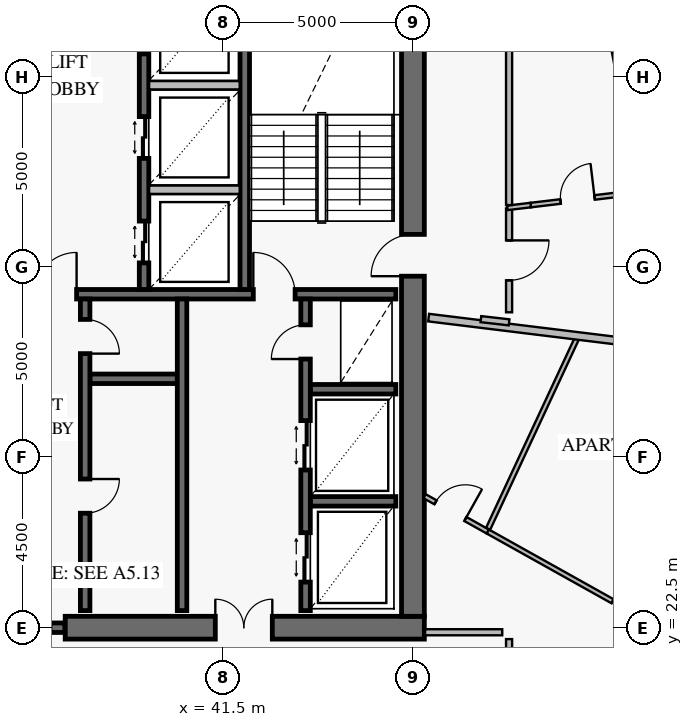
"""IFC4 building model, lengths in metres.
Left out: names, types, materials, properties, quantities, classifications, styles, units other than length and angle.
Written with IfcOpenShell. Run it as: python <this file> out.ifc"""

import sys

from ifc_helpers import new_model, si_unit, direction, frame, frame_2d, origin, place, context, subcontext, project, spatial, rectangle, extrude, element, fill, save


model = new_model("IFC4")
c1 = context("Model", 3, precision=1e-05, world=origin(), true_north=direction((0.0, 1.0)))
c2 = subcontext(c1, "Body", "Model", "MODEL_VIEW")
j1 = project(units=[si_unit("LENGTHUNIT", "METRE"), si_unit("PLANEANGLEUNIT", "RADIAN")], contexts=[c1])
p1 = place(None, origin())
s1 = spatial("IfcSite", under=j1, at=p1, CompositionType="ELEMENT")
p2 = place(p1, origin())
s2 = spatial("IfcBuilding", under=s1, at=p2, CompositionType="ELEMENT")
p3 = place(p2, frame((0.0, 0.0, 265.4)))
s3 = spatial("IfcBuildingStorey", under=s2, at=p3, CompositionType="ELEMENT", Elevation=265.4)
p4 = place(p3, frame((37.35, 22.5, 0.0), z_axis=(0.0, 0.0, 1.0), x_axis=(1.0, 0.0, 0.0)))
e1 = element("IfcWall", 1, at=p4, inside=s3, PredefinedType="SHEAR", context=c2, shape_type="SweptSolid", body=[
    extrude(rectangle(XDim=9.45, YDim=0.6, at=frame_2d((4.725, 0.0))), origin(), (0.0, 0.0, 1.0), 3.8),
])
p5 = place(p4, frame((3.95, 0.0, 0.0)))
e2 = element("IfcOpeningElement", 2, at=p5, cuts=e1, PredefinedType="OPENING", context=c2, shape_type="SweptSolid", body=[
    extrude(rectangle(XDim=1.5, YDim=2.15, at=frame_2d((0.75, 1.075))), frame((0.0, 0.312, 0.0), z_axis=(0.0, -1.0, 0.0), x_axis=(1.0, 0.0, 0.0)), (0.0, 0.0, 1.0), 0.624),
])
p6 = place(p3, frame((46.5, 22.8, 0.0), z_axis=(0.0, 0.0, 1.0), x_axis=(0.0, 1.0, 0.0)))
e3 = element("IfcWall", 3, at=p6, inside=s3, PredefinedType="SHEAR", context=c2, shape_type="SweptSolid", body=[
    extrude(rectangle(XDim=18.4, YDim=0.6, at=frame_2d((9.2, 0.0))), origin(), (0.0, 0.0, 1.0), 3.8),
])
p7 = place(p6, frame((8.95, 0.0, 0.0)))
e4 = element("IfcOpeningElement", 4, at=p7, cuts=e3, PredefinedType="OPENING", context=c2, shape_type="SweptSolid", body=[
    extrude(rectangle(XDim=1.1, YDim=2.15, at=frame_2d((0.55, 1.075))), frame((0.0, 0.312, 0.0), z_axis=(0.0, -1.0, 0.0), x_axis=(1.0, 0.0, 0.0)), (0.0, 0.0, 1.0), 0.624),
])
p8 = place(p3, frame((35.06, 22.5, 0.0), z_axis=(0.0, 0.0, 1.0), x_axis=(1.0, 0.0, 0.0)))
e5 = element("IfcWall", 5, at=p8, inside=s3, PredefinedType="SOLIDWALL", context=c2, shape_type="SweptSolid", body=[
    extrude(rectangle(XDim=2.28, YDim=0.25, at=frame_2d((1.14, 0.0))), origin(), (0.0, 0.0, 1.0), 3.8),
])
p9 = place(p8, frame((0.39, 0.0, 0.0)))
e6 = element("IfcOpeningElement", 6, at=p9, cuts=e5, PredefinedType="OPENING", context=c2, shape_type="SweptSolid", body=[
    extrude(rectangle(XDim=1.5, YDim=2.15, at=frame_2d((0.75, 1.075))), frame((0.0, 0.137, 0.0), z_axis=(0.0, -1.0, 0.0), x_axis=(1.0, 0.0, 0.0)), (0.0, 0.0, 1.0), 0.274),
])
p10 = place(p3, frame((25.95, 31.275, 0.0), z_axis=(0.0, 0.0, 1.0), x_axis=(1.0, 0.0, 0.0)))
e7 = element("IfcWall", 7, at=p10, inside=s3, PredefinedType="SOLIDWALL", context=c2, shape_type="SweptSolid", body=[
    extrude(rectangle(XDim=20.1, YDim=0.25, at=frame_2d((10.05, 0.0))), origin(), (0.0, 0.0, 1.0), 3.8),
])
p11 = place(p10, frame((2.6, 0.0, 0.0)))
e8 = element("IfcOpeningElement", 8, at=p11, cuts=e7, PredefinedType="OPENING", context=c2, shape_type="SweptSolid", body=[
    extrude(rectangle(XDim=1.1, YDim=2.15, at=frame_2d((0.55, 1.075))), frame((0.0, 0.137, 0.0), z_axis=(0.0, -1.0, 0.0), x_axis=(1.0, 0.0, 0.0)), (0.0, 0.0, 1.0), 0.274),
])
p12 = place(p10, frame((10.6, 0.0, 0.0)))
e9 = element("IfcOpeningElement", 9, at=p12, cuts=e7, PredefinedType="OPENING", context=c2, shape_type="SweptSolid", body=[
    extrude(rectangle(XDim=1.1, YDim=2.15, at=frame_2d((0.55, 1.075))), frame((0.0, 0.137, 0.0), z_axis=(0.0, -1.0, 0.0), x_axis=(1.0, 0.0, 0.0)), (0.0, 0.0, 1.0), 0.274),
])
p13 = place(p10, frame((16.35, 0.0, 0.0)))
e10 = element("IfcOpeningElement", 10, at=p13, cuts=e7, PredefinedType="OPENING", context=c2, shape_type="SweptSolid", body=[
    extrude(rectangle(XDim=1.1, YDim=2.15, at=frame_2d((0.55, 1.075))), frame((0.0, 0.137, 0.0), z_axis=(0.0, -1.0, 0.0), x_axis=(1.0, 0.0, 0.0)), (0.0, 0.0, 1.0), 0.274),
])
p14 = place(p3, frame((42.075, 31.4, 0.0), z_axis=(0.0, 0.0, 1.0), x_axis=(0.0, 1.0, 0.0)))
e11 = element("IfcWall", 11, at=p14, inside=s3, PredefinedType="SOLIDWALL", context=c2, shape_type="SweptSolid", body=[
    extrude(rectangle(XDim=9.7, YDim=0.25, at=frame_2d((4.85, 0.0))), origin(), (0.0, 0.0, 1.0), 3.8),
])
p15 = place(p3, frame((39.425, 31.4, 0.0), z_axis=(0.0, 0.0, 1.0), x_axis=(0.0, 1.0, 0.0)))
e12 = element("IfcWall", 12, at=p15, inside=s3, PredefinedType="SOLIDWALL", context=c2, shape_type="SweptSolid", body=[
    extrude(rectangle(XDim=9.65, YDim=0.25, at=frame_2d((4.825, 0.0))), origin(), (0.0, 0.0, 1.0), 3.8),
])
p16 = place(p15, frame((0.7, 0.0, 0.0)))
e13 = element("IfcOpeningElement", 13, at=p16, cuts=e12, PredefinedType="OPENING", context=c2, shape_type="SweptSolid", body=[
    extrude(rectangle(XDim=1.1, YDim=2.2, at=frame_2d((0.55, 1.1))), frame((0.0, 0.137, 0.0), z_axis=(0.0, -1.0, 0.0), x_axis=(1.0, 0.0, 0.0)), (0.0, 0.0, 1.0), 0.274),
])
p17 = place(p15, frame((3.45, 0.0, 0.0)))
e14 = element("IfcOpeningElement", 14, at=p17, cuts=e12, PredefinedType="OPENING", context=c2, shape_type="SweptSolid", body=[
    extrude(rectangle(XDim=1.1, YDim=2.2, at=frame_2d((0.55, 1.1))), frame((0.0, 0.137, 0.0), z_axis=(0.0, -1.0, 0.0), x_axis=(1.0, 0.0, 0.0)), (0.0, 0.0, 1.0), 0.274),
])
p18 = place(p15, frame((6.2, 0.0, 0.0)))
e15 = element("IfcOpeningElement", 15, at=p18, cuts=e12, PredefinedType="OPENING", context=c2, shape_type="SweptSolid", body=[
    extrude(rectangle(XDim=1.1, YDim=2.2, at=frame_2d((0.55, 1.1))), frame((0.0, 0.137, 0.0), z_axis=(0.0, -1.0, 0.0), x_axis=(1.0, 0.0, 0.0)), (0.0, 0.0, 1.0), 0.274),
])
p19 = place(p15, frame((8.47, 0.0, 0.0)))
e16 = element("IfcOpeningElement", 16, at=p19, cuts=e12, PredefinedType="OPENING", context=c2, shape_type="SweptSolid", body=[
    extrude(rectangle(XDim=0.9, YDim=2.1, at=frame_2d((0.45, 1.05))), frame((0.0, 0.137, 0.0), z_axis=(0.0, -1.0, 0.0), x_axis=(1.0, 0.0, 0.0)), (0.0, 0.0, 1.0), 0.274),
])
p20 = place(p3, frame((38.0, 29.05, 0.0), z_axis=(0.0, 0.0, 1.0), x_axis=(1.0, 0.0, 0.0)))
e17 = element("IfcWall", 17, at=p20, inside=s3, PredefinedType="SOLIDWALL", context=c2, shape_type="SweptSolid", body=[
    extrude(rectangle(XDim=2.3, YDim=0.25, at=frame_2d((1.15, 0.0))), origin(), (0.0, 0.0, 1.0), 3.8),
])
p21 = place(p3, frame((37.875, 22.95, 0.0), z_axis=(0.0, 0.0, 1.0), x_axis=(0.0, 1.0, 0.0)))
e18 = element("IfcWall", 18, at=p21, inside=s3, PredefinedType="SOLIDWALL", context=c2, shape_type="SweptSolid", body=[
    extrude(rectangle(XDim=8.2, YDim=0.25, at=frame_2d((4.1, 0.0))), origin(), (0.0, 0.0, 1.0), 3.8),
])
p22 = place(p21, frame((2.562, 0.0, 0.0)))
e19 = element("IfcOpeningElement", 19, at=p22, cuts=e18, PredefinedType="OPENING", context=c2, shape_type="SweptSolid", body=[
    extrude(rectangle(XDim=0.9, YDim=2.1, at=frame_2d((0.45, 1.05))), frame((0.0, 0.137, 0.0), z_axis=(0.0, -1.0, 0.0), x_axis=(1.0, 0.0, 0.0)), (0.0, 0.0, 1.0), 0.274),
])
p23 = place(p21, frame((6.762, 0.0, 0.0)))
e20 = element("IfcOpeningElement", 20, at=p23, cuts=e18, PredefinedType="OPENING", context=c2, shape_type="SweptSolid", body=[
    extrude(rectangle(XDim=0.9, YDim=2.1, at=frame_2d((0.45, 1.05))), frame((0.0, 0.137, 0.0), z_axis=(0.0, -1.0, 0.0), x_axis=(1.0, 0.0, 0.0)), (0.0, 0.0, 1.0), 0.274),
])
p24 = place(p3, frame((40.425, 22.95, 0.0), z_axis=(0.0, 0.0, 1.0), x_axis=(0.0, 1.0, 0.0)))
e21 = element("IfcWall", 21, at=p24, inside=s3, PredefinedType="SOLIDWALL", context=c2, shape_type="SweptSolid", body=[
    extrude(rectangle(XDim=8.2, YDim=0.25, at=frame_2d((4.1, 0.0))), origin(), (0.0, 0.0, 1.0), 3.8),
])
for number, where, z_axis, x_axis in (
    (22, (43.8, 25.825, 0.0), (0.0, 0.0, 1.0), (1.0, 0.0, 0.0)),
    (23, (43.8, 28.775, 0.0), (0.0, 0.0, 1.0), (1.0, 0.0, 0.0)),
):
    element("IfcWall", number, at=place(p3, frame(where, z_axis=z_axis, x_axis=x_axis)), inside=s3, PredefinedType="SOLIDWALL", context=c2, shape_type="SweptSolid", body=[
        extrude(rectangle(XDim=2.25, YDim=0.25, at=frame_2d((1.125, 0.0))), origin(), (0.0, 0.0, 1.0), 3.8),
    ])
p25 = place(p3, frame((43.675, 22.95, 0.0), z_axis=(0.0, 0.0, 1.0), x_axis=(0.0, 1.0, 0.0)))
e24 = element("IfcWall", 24, at=p25, inside=s3, PredefinedType="SOLIDWALL", context=c2, shape_type="SweptSolid", body=[
    extrude(rectangle(XDim=8.2, YDim=0.25, at=frame_2d((4.1, 0.0))), origin(), (0.0, 0.0, 1.0), 3.8),
])
p26 = place(p25, frame((0.75, 0.0, 0.0)))
e25 = element("IfcOpeningElement", 25, at=p26, cuts=e24, PredefinedType="OPENING", context=c2, shape_type="SweptSolid", body=[
    extrude(rectangle(XDim=1.3, YDim=2.3, at=frame_2d((0.65, 1.15))), frame((0.0, 0.137, 0.0), z_axis=(0.0, -1.0, 0.0), x_axis=(1.0, 0.0, 0.0)), (0.0, 0.0, 1.0), 0.274),
])
p27 = place(p25, frame((3.7, 0.0, 0.0)))
e26 = element("IfcOpeningElement", 26, at=p27, cuts=e24, PredefinedType="OPENING", context=c2, shape_type="SweptSolid", body=[
    extrude(rectangle(XDim=1.3, YDim=2.3, at=frame_2d((0.65, 1.15))), frame((0.0, 0.137, 0.0), z_axis=(0.0, -1.0, 0.0), x_axis=(1.0, 0.0, 0.0)), (0.0, 0.0, 1.0), 0.274),
])
p28 = place(p25, frame((6.62, 0.0, 0.0)))
e27 = element("IfcOpeningElement", 27, at=p28, cuts=e24, PredefinedType="OPENING", context=c2, shape_type="SweptSolid", body=[
    extrude(rectangle(XDim=0.9, YDim=2.1, at=frame_2d((0.45, 1.05))), frame((0.0, 0.137, 0.0), z_axis=(0.0, -1.0, 0.0), x_axis=(1.0, 0.0, 0.0)), (0.0, 0.0, 1.0), 0.274),
])
p29 = place(p3, frame((46.808, 25.96, 0.0), z_axis=(0.0, 0.0, 1.0), x_axis=(0.872879297485, -0.487936196672, 0.0)))
e28 = element("IfcWall", 28, at=p29, inside=s3, PredefinedType="PARTITIONING", context=c2, shape_type="SweptSolid", body=[
    extrude(rectangle(XDim=1.906, YDim=0.12, at=frame_2d((0.953, 0.0))), origin(), (0.0, 0.0, 1.0), 3.55),
])
p30 = place(p29, frame((0.329, 0.0, 0.0)))
e29 = element("IfcOpeningElement", 29, at=p30, cuts=e28, PredefinedType="OPENING", context=c2, shape_type="SweptSolid", body=[
    extrude(rectangle(XDim=0.9, YDim=2.1, at=frame_2d((0.45, 1.05))), frame((0.0, 0.072, 0.0), z_axis=(0.0, -1.0, 0.0), x_axis=(1.0, 0.0, 0.0)), (0.0, 0.0, 1.0), 0.144),
])
p31 = place(p3, frame((48.472, 25.03, 0.0), z_axis=(0.0, 0.0, 1.0), x_axis=(0.872916935633, -0.487868858901, 0.0)))
e30 = element("IfcWall", 30, at=p31, inside=s3, PredefinedType="PARTITIONING", context=c2, shape_type="SweptSolid", body=[
    extrude(rectangle(XDim=8.524, YDim=0.12, at=frame_2d((4.262, 0.0))), origin(), (0.0, 0.0, 1.0), 3.15),
])
p32 = place(p31, frame((3.762, 0.0, 0.0)))
e31 = element("IfcOpeningElement", 31, at=p32, cuts=e30, PredefinedType="OPENING", context=c2, shape_type="SweptSolid", body=[
    extrude(rectangle(XDim=0.95, YDim=2.1, at=frame_2d((0.475, 1.05))), frame((0.0, 0.072, 0.0), z_axis=(0.0, -1.0, 0.0), x_axis=(1.0, 0.0, 0.0)), (0.0, 0.0, 1.0), 0.144),
])
p33 = place(p3, frame((49.03, 20.15, 0.0), z_axis=(0.0, 0.0, 1.0), x_axis=(0.0, 1.0, 0.0)))
e32 = element("IfcWall", 32, at=p33, inside=s3, PredefinedType="PARTITIONING", context=c2, shape_type="SweptSolid", body=[
    extrude(rectangle(XDim=2.05, YDim=0.16, at=frame_2d((1.025, 0.0))), origin(), (0.0, 0.0, 1.0), 3.55),
])
p34 = place(p33, frame((0.5, 0.0, 0.0)))
e33 = element("IfcOpeningElement", 33, at=p34, cuts=e32, PredefinedType="OPENING", context=c2, shape_type="SweptSolid", body=[
    extrude(rectangle(XDim=1.05, YDim=2.15, at=frame_2d((0.525, 1.075))), frame((0.0, 0.092, 0.0), z_axis=(0.0, -1.0, 0.0), x_axis=(1.0, 0.0, 0.0)), (0.0, 0.0, 1.0), 0.184),
])
p35 = place(p3, frame((49.6, 33.622, 0.0), z_axis=(0.0, 0.0, 1.0), x_axis=(0.992962166998, 0.11843198432, 0.0)))
e34 = element("IfcWall", 34, at=p35, inside=s3, PredefinedType="PARTITIONING", context=c2, shape_type="SweptSolid", body=[
    extrude(rectangle(XDim=2.956, YDim=0.12, at=frame_2d((1.478, 0.0))), origin(), (0.0, 0.0, 1.0), 3.55),
])
p36 = place(p35, frame((0.792, 0.0, 0.0)))
e35 = element("IfcOpeningElement", 35, at=p36, cuts=e34, PredefinedType="OPENING", context=c2, shape_type="SweptSolid", body=[
    extrude(rectangle(XDim=0.9, YDim=2.1, at=frame_2d((0.45, 1.05))), frame((0.0, 0.072, 0.0), z_axis=(0.0, -1.0, 0.0), x_axis=(1.0, 0.0, 0.0)), (0.0, 0.0, 1.0), 0.144),
])
p37 = place(p3, frame((49.03, 30.8, 0.0), z_axis=(0.0, 0.0, 1.0), x_axis=(0.0, 1.0, 0.0)))
e36 = element("IfcWall", 36, at=p37, inside=s3, PredefinedType="PARTITIONING", context=c2, shape_type="SweptSolid", body=[
    extrude(rectangle(XDim=2.734, YDim=0.16, at=frame_2d((1.367, 0.0))), origin(), (0.0, 0.0, 1.0), 3.55),
])
p38 = place(p37, frame((0.842, 0.0, 0.0)))
e37 = element("IfcOpeningElement", 37, at=p38, cuts=e36, PredefinedType="OPENING", context=c2, shape_type="SweptSolid", body=[
    extrude(rectangle(XDim=1.05, YDim=2.15, at=frame_2d((0.525, 1.075))), frame((0.0, 0.092, 0.0), z_axis=(0.0, -1.0, 0.0), x_axis=(1.0, 0.0, 0.0)), (0.0, 0.0, 1.0), 0.184),
])
for number, where, z_axis, x_axis in (
    (38, (39.558, 34.025, 0.0), (0.0, 0.0, 1.0), (1.0, 0.0, 0.0)),
    (39, (39.558, 36.775, 0.0), (0.0, 0.0, 1.0), (1.0, 0.0, 0.0)),
):
    element("IfcWall", number, at=place(p3, frame(where, z_axis=z_axis, x_axis=x_axis)), inside=s3, PredefinedType="PARTITIONING", context=c2, shape_type="SweptSolid", body=[
        extrude(rectangle(XDim=2.384, YDim=0.22, at=frame_2d((1.192, 0.0))), origin(), (0.0, 0.0, 1.0), 3.55),
    ])
p39 = place(p3, frame((48.479, 25.104, 0.0), z_axis=(0.0, 0.0, 1.0), x_axis=(0.422623708153, 0.906305247313, 0.0)))
e40 = element("IfcWall", 40, at=p39, inside=s3, PredefinedType="PARTITIONING", context=c2, shape_type="SweptSolid", body=[
    extrude(rectangle(XDim=5.566, YDim=0.12, at=frame_2d((2.783, 0.0))), origin(), (0.0, 0.0, 1.0), 2.95),
])
p40 = place(p3, frame((46.913, 30.66, 0.0), z_axis=(0.0, 0.0, 1.0), x_axis=(0.992546420308, -0.121867155269, 0.0)))
e41 = element("IfcWall", 41, at=p40, inside=s3, PredefinedType="PARTITIONING", context=c2, shape_type="SweptSolid", body=[
    extrude(rectangle(XDim=16.776, YDim=0.2, at=frame_2d((8.388, 0.0))), origin(), (0.0, 0.0, 1.0), 2.93),
])
p41 = place(p3, frame((48.985, 33.548, 0.0), z_axis=(0.0, 0.0, 1.0), x_axis=(0.992982764492, 0.118259162107, 0.0)))
e42 = element("IfcWall", 42, at=p41, inside=s3, PredefinedType="PARTITIONING", context=c2, shape_type="SweptSolid", body=[
    extrude(rectangle(XDim=0.619, YDim=0.12, at=frame_2d((0.31, 0.0))), origin(), (0.0, 0.0, 1.0), 3.55),
])
p42 = place(p3, frame((52.498, 34.036, 0.0), z_axis=(0.0, 0.0, 1.0), x_axis=(-0.190812206092, 0.981626559342, 0.0)))
e43 = element("IfcWall", 43, at=p42, inside=s3, PredefinedType="PARTITIONING", context=c2, shape_type="SweptSolid", body=[
    extrude(rectangle(XDim=6.483, YDim=0.12, at=frame_2d((3.242, 0.0))), origin(), (0.0, 0.0, 1.0), 2.95),
])
p43 = place(p3, frame((48.85, 22.38, 0.0), z_axis=(0.0, 0.0, 1.0), x_axis=(-1.0, 0.0, 0.0)))
e44 = element("IfcWall", 44, at=p43, inside=s3, PredefinedType="PARTITIONING", context=c2, shape_type="SweptSolid", body=[
    extrude(rectangle(XDim=2.03, YDim=0.16, at=frame_2d((1.015, 0.0))), origin(), (0.0, 0.0, 1.0), 3.55),
])
p44 = place(p3, frame((49.03, 30.536, 0.0), z_axis=(0.0, 0.0, 1.0), x_axis=(-0.993568487463, 0.113232772287, 0.0)))
e45 = element("IfcWall", 45, at=p44, inside=s3, PredefinedType="PARTITIONING", context=c2, shape_type="SweptSolid", body=[
    extrude(rectangle(XDim=0.746, YDim=0.16, at=frame_2d((0.373, 0.0))), origin(), (0.0, 0.0, 1.0), 3.55),
])
p45 = place(p3, frame((49.03, 33.622, 0.0), z_axis=(0.0, 0.0, 1.0), x_axis=(0.0, 1.0, 0.0)))
e46 = element("IfcWall", 46, at=p45, inside=s3, PredefinedType="PARTITIONING", context=c2, shape_type="SweptSolid", body=[
    extrude(rectangle(XDim=5.43, YDim=0.16, at=frame_2d((2.715, 0.0))), origin(), (0.0, 0.0, 1.0), 2.95),
])
p46 = place(p7, origin())
e47 = element("IfcDoor", 47, at=p46, inside=s3, OperationType="SINGLE_SWING_LEFT", PredefinedType="USERDEFINED", context=c2, shape_type="SweptSolid", body=[
    extrude(rectangle(XDim=1.1, YDim=2.15, at=frame_2d((0.55, 1.075))), frame((0.0, 0.025, 0.0), z_axis=(0.0, -1.0, 0.0), x_axis=(1.0, 0.0, 0.0)), (0.0, 0.0, 1.0), 0.05),
])
fill(e4, e47)
p47 = place(p5, origin())
e48 = element("IfcDoor", 48, at=p47, inside=s3, OperationType="DOUBLE_DOOR_SINGLE_SWING", PredefinedType="DOOR", context=c2, shape_type="SweptSolid", body=[
    extrude(rectangle(XDim=1.5, YDim=2.15, at=frame_2d((0.75, 1.075))), frame((0.0, 0.025, 0.0), z_axis=(0.0, -1.0, 0.0), x_axis=(1.0, 0.0, 0.0)), (0.0, 0.0, 1.0), 0.05),
])
fill(e2, e48)
p48 = place(p12, origin())
e49 = element("IfcDoor", 49, at=p48, inside=s3, OperationType="SINGLE_SWING_RIGHT", PredefinedType="USERDEFINED", context=c2, shape_type="SweptSolid", body=[
    extrude(rectangle(XDim=1.1, YDim=2.15, at=frame_2d((0.55, 1.075))), frame((0.0, 0.025, 0.0), z_axis=(0.0, -1.0, 0.0), x_axis=(1.0, 0.0, 0.0)), (0.0, 0.0, 1.0), 0.05),
])
fill(e9, e49)
p49 = place(p13, origin())
e50 = element("IfcDoor", 50, at=p49, inside=s3, OperationType="SINGLE_SWING_LEFT", PredefinedType="USERDEFINED", context=c2, shape_type="SweptSolid", body=[
    extrude(rectangle(XDim=1.1, YDim=2.15, at=frame_2d((0.55, 1.075))), frame((0.0, 0.025, 0.0), z_axis=(0.0, -1.0, 0.0), x_axis=(1.0, 0.0, 0.0)), (0.0, 0.0, 1.0), 0.05),
])
fill(e10, e50)
p50 = place(p16, origin())
e51 = element("IfcDoor", 51, at=p50, inside=s3, OperationType="DOUBLE_DOOR_SLIDING", PredefinedType="DOOR", context=c2, shape_type="SweptSolid", body=[
    extrude(rectangle(XDim=1.1, YDim=2.2, at=frame_2d((0.55, 1.1))), frame((0.0, 0.025, 0.0), z_axis=(0.0, -1.0, 0.0), x_axis=(1.0, 0.0, 0.0)), (0.0, 0.0, 1.0), 0.05),
])
fill(e13, e51)
p51 = place(p17, origin())
e52 = element("IfcDoor", 52, at=p51, inside=s3, OperationType="DOUBLE_DOOR_SLIDING", PredefinedType="DOOR", context=c2, shape_type="SweptSolid", body=[
    extrude(rectangle(XDim=1.1, YDim=2.2, at=frame_2d((0.55, 1.1))), frame((0.0, 0.025, 0.0), z_axis=(0.0, -1.0, 0.0), x_axis=(1.0, 0.0, 0.0)), (0.0, 0.0, 1.0), 0.05),
])
fill(e14, e52)
p52 = place(p18, origin())
e53 = element("IfcDoor", 53, at=p52, inside=s3, OperationType="DOUBLE_DOOR_SLIDING", PredefinedType="DOOR", context=c2, shape_type="SweptSolid", body=[
    extrude(rectangle(XDim=1.1, YDim=2.2, at=frame_2d((0.55, 1.1))), frame((0.0, 0.025, 0.0), z_axis=(0.0, -1.0, 0.0), x_axis=(1.0, 0.0, 0.0)), (0.0, 0.0, 1.0), 0.05),
])
fill(e15, e53)
p53 = place(p22, frame((0.9, 0.0, 0.0), z_axis=(0.0, 0.0, 1.0), x_axis=(-1.0, 0.0, 0.0)))
e54 = element("IfcDoor", 54, at=p53, inside=s3, OperationType="SINGLE_SWING_LEFT", PredefinedType="DOOR", context=c2, shape_type="SweptSolid", body=[
    extrude(rectangle(XDim=0.9, YDim=2.1, at=frame_2d((0.45, 1.05))), frame((0.0, 0.025, 0.0), z_axis=(0.0, -1.0, 0.0), x_axis=(1.0, 0.0, 0.0)), (0.0, 0.0, 1.0), 0.05),
])
fill(e19, e54)
p54 = place(p23, frame((0.9, 0.0, 0.0), z_axis=(0.0, 0.0, 1.0), x_axis=(-1.0, 0.0, 0.0)))
e55 = element("IfcDoor", 55, at=p54, inside=s3, OperationType="SINGLE_SWING_RIGHT", PredefinedType="DOOR", context=c2, shape_type="SweptSolid", body=[
    extrude(rectangle(XDim=0.9, YDim=2.1, at=frame_2d((0.45, 1.05))), frame((0.0, 0.025, 0.0), z_axis=(0.0, -1.0, 0.0), x_axis=(1.0, 0.0, 0.0)), (0.0, 0.0, 1.0), 0.05),
])
fill(e20, e55)
p55 = place(p26, origin())
e56 = element("IfcDoor", 56, at=p55, inside=s3, OperationType="DOUBLE_DOOR_SLIDING", PredefinedType="DOOR", context=c2, shape_type="SweptSolid", body=[
    extrude(rectangle(XDim=1.3, YDim=2.3, at=frame_2d((0.65, 1.15))), frame((0.0, 0.025, 0.0), z_axis=(0.0, -1.0, 0.0), x_axis=(1.0, 0.0, 0.0)), (0.0, 0.0, 1.0), 0.05),
])
fill(e25, e56)
p56 = place(p27, origin())
e57 = element("IfcDoor", 57, at=p56, inside=s3, OperationType="DOUBLE_DOOR_SLIDING", PredefinedType="DOOR", context=c2, shape_type="SweptSolid", body=[
    extrude(rectangle(XDim=1.3, YDim=2.3, at=frame_2d((0.65, 1.15))), frame((0.0, 0.025, 0.0), z_axis=(0.0, -1.0, 0.0), x_axis=(1.0, 0.0, 0.0)), (0.0, 0.0, 1.0), 0.05),
])
fill(e26, e57)
p57 = place(p28, origin())
e58 = element("IfcDoor", 58, at=p57, inside=s3, OperationType="SINGLE_SWING_LEFT", PredefinedType="DOOR", context=c2, shape_type="SweptSolid", body=[
    extrude(rectangle(XDim=0.9, YDim=2.1, at=frame_2d((0.45, 1.05))), frame((0.0, 0.025, 0.0), z_axis=(0.0, -1.0, 0.0), x_axis=(1.0, 0.0, 0.0)), (0.0, 0.0, 1.0), 0.05),
])
fill(e27, e58)
p58 = place(p30, origin())
e59 = element("IfcDoor", 59, at=p58, inside=s3, OperationType="SINGLE_SWING_RIGHT", PredefinedType="DOOR", context=c2, shape_type="SweptSolid", body=[
    extrude(rectangle(XDim=0.9, YDim=2.1, at=frame_2d((0.45, 1.05))), frame((0.0, 0.025, 0.0), z_axis=(0.0, -1.0, 0.0), x_axis=(1.0, 0.0, 0.0)), (0.0, 0.0, 1.0), 0.05),
])
fill(e29, e59)
p59 = place(p32, origin())
e60 = element("IfcDoor", 60, at=p59, inside=s3, OperationType="SINGLE_SWING_LEFT", PredefinedType="DOOR", context=c2, shape_type="SweptSolid", body=[
    extrude(rectangle(XDim=0.95, YDim=2.1, at=frame_2d((0.475, 1.05))), frame((0.0, 0.025, 0.0), z_axis=(0.0, -1.0, 0.0), x_axis=(1.0, 0.0, 0.0)), (0.0, 0.0, 1.0), 0.05),
])
fill(e31, e60)
p60 = place(p36, origin())
e61 = element("IfcDoor", 61, at=p60, inside=s3, OperationType="SINGLE_SWING_RIGHT", PredefinedType="DOOR", context=c2, shape_type="SweptSolid", body=[
    extrude(rectangle(XDim=0.9, YDim=2.1, at=frame_2d((0.45, 1.05))), frame((0.0, 0.025, 0.0), z_axis=(0.0, -1.0, 0.0), x_axis=(1.0, 0.0, 0.0)), (0.0, 0.0, 1.0), 0.05),
])
fill(e35, e61)
p61 = place(p38, frame((1.05, 0.0, 0.0), z_axis=(0.0, 0.0, 1.0), x_axis=(-1.0, 0.0, 0.0)))
e62 = element("IfcDoor", 62, at=p61, inside=s3, OperationType="SINGLE_SWING_LEFT", PredefinedType="DOOR", context=c2, shape_type="SweptSolid", body=[
    extrude(rectangle(XDim=1.05, YDim=2.15, at=frame_2d((0.525, 1.075))), frame((0.0, 0.025, 0.0), z_axis=(0.0, -1.0, 0.0), x_axis=(1.0, 0.0, 0.0)), (0.0, 0.0, 1.0), 0.05),
])
fill(e37, e62)
save(model, sys.argv[1])
